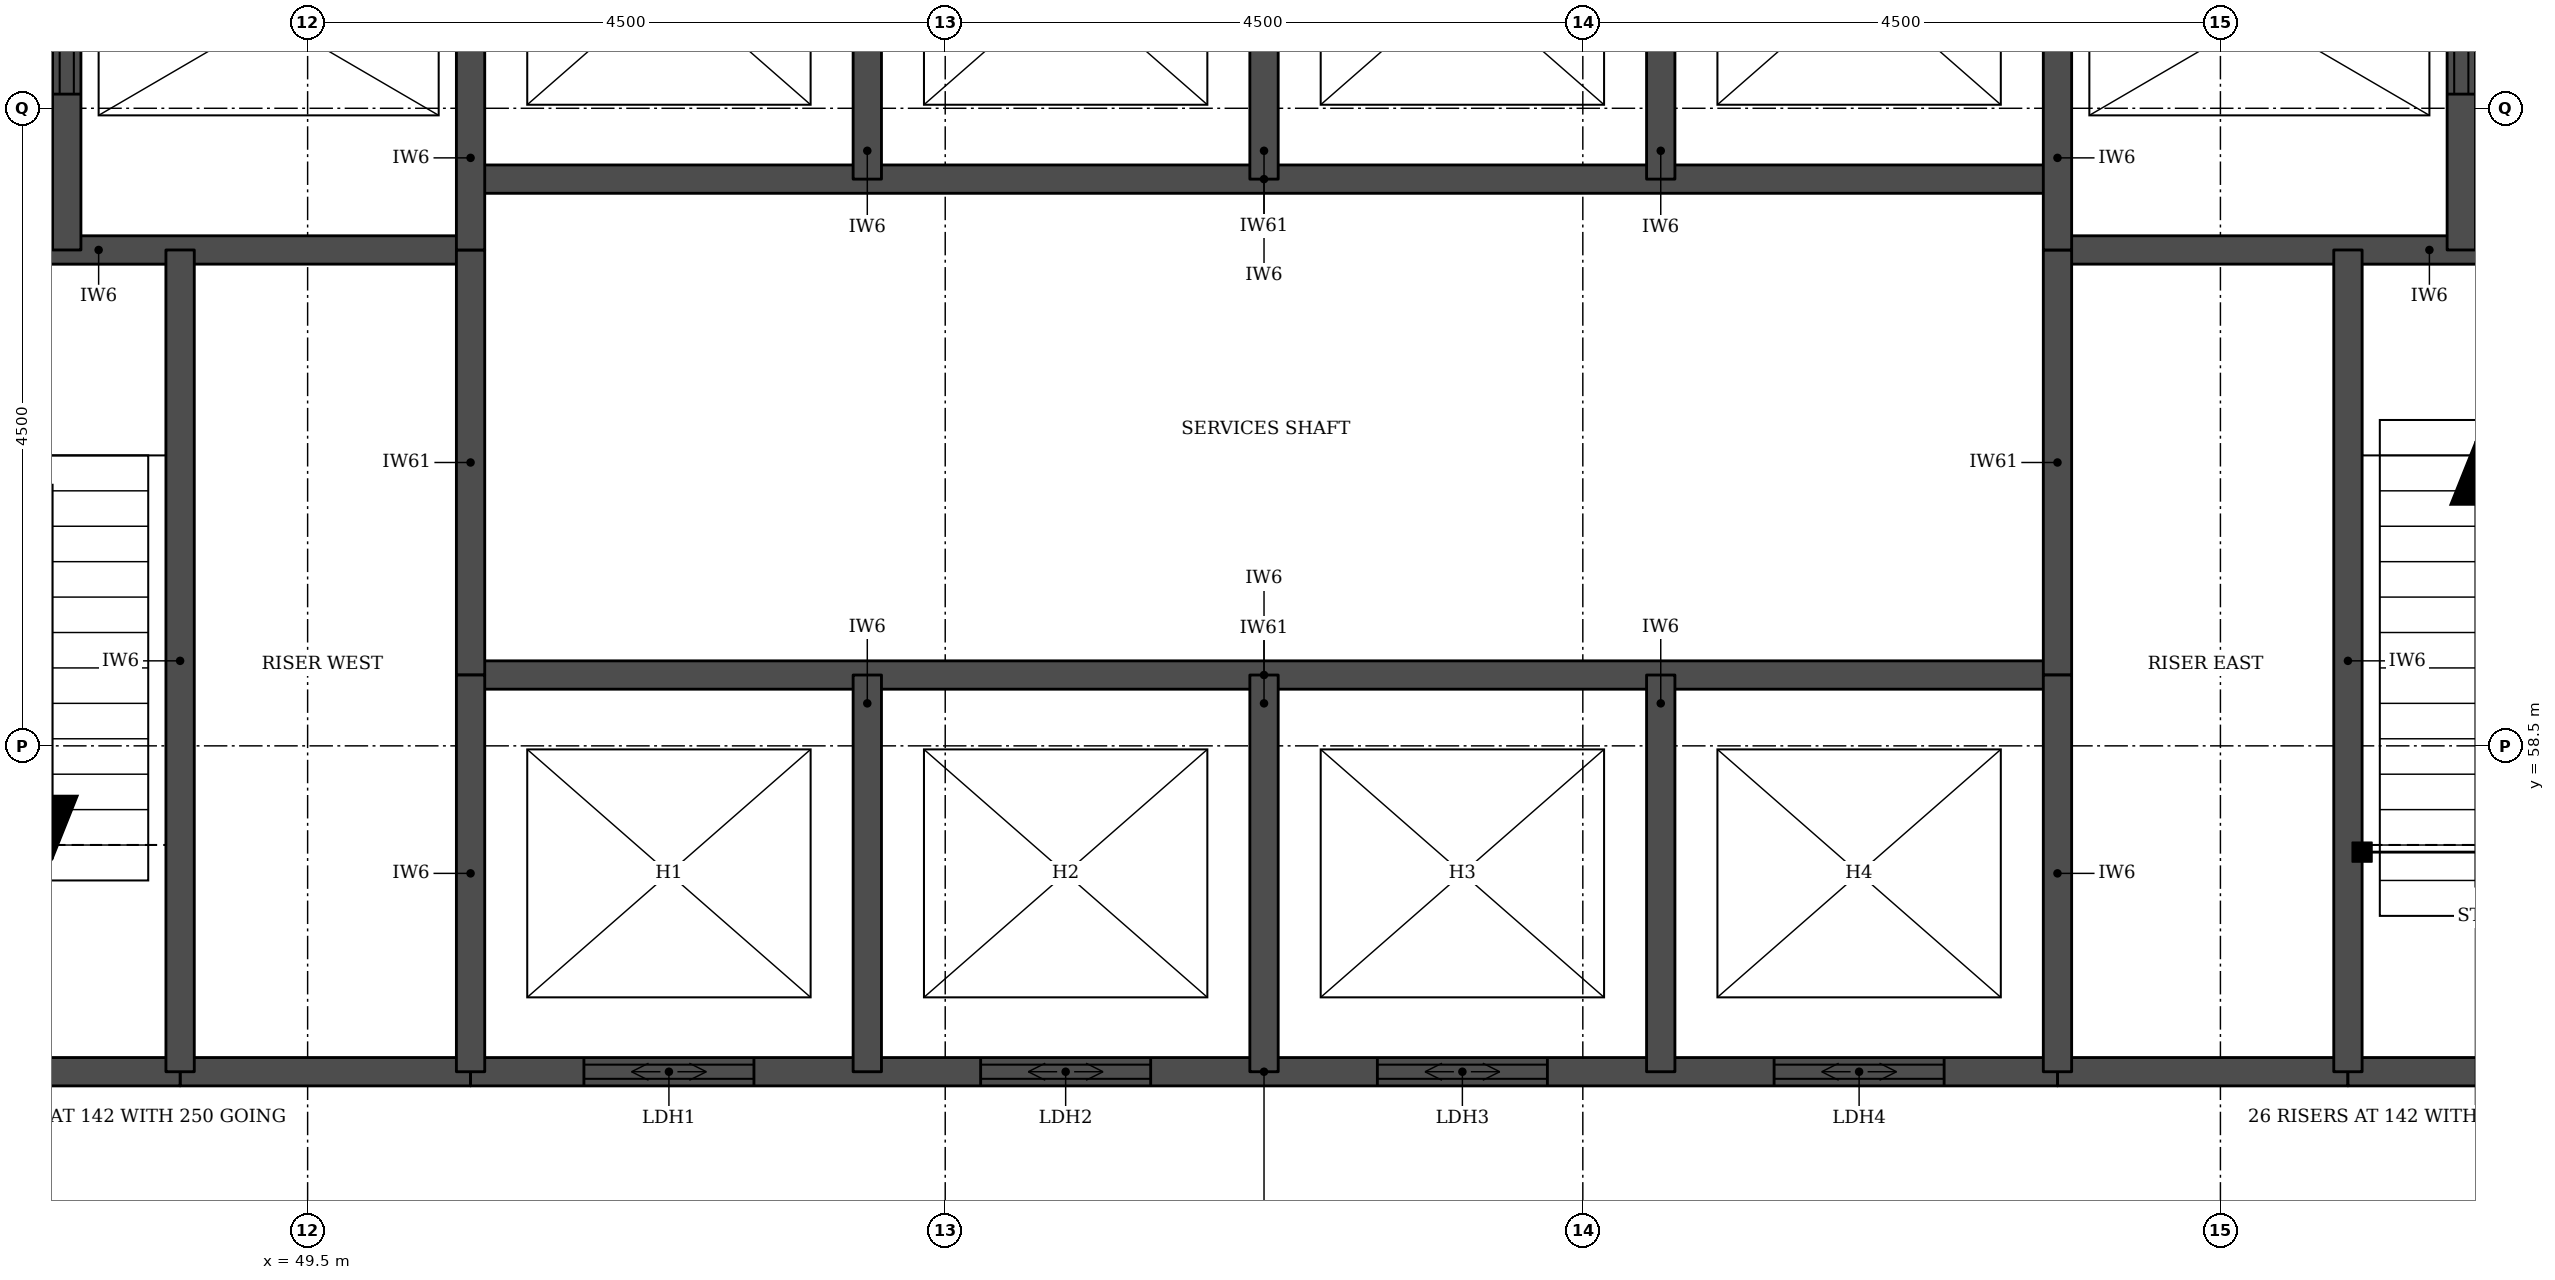
"""IFC4 building model, lengths in metres.
Left out: names, types, materials, properties, quantities, classifications, styles, units other than length and angle.
Written with IfcOpenShell. Run it as: python <this file> out.ifc"""

import sys

from ifc_helpers import new_model, si_unit, direction, frame, frame_2d, origin, place, context, subcontext, project, spatial, rectangle, extrude, element, fill, save


model = new_model("IFC4")
c1 = context("Model", 3, precision=1e-05, world=origin(), true_north=direction((0.0, 1.0)))
c2 = subcontext(c1, "Body", "Model", "MODEL_VIEW")
j1 = project(units=[si_unit("LENGTHUNIT", "METRE"), si_unit("PLANEANGLEUNIT", "RADIAN")], contexts=[c1])
p1 = place(None, origin())
s1 = spatial("IfcSite", under=j1, at=p1, CompositionType="ELEMENT")
p2 = place(p1, origin())
s2 = spatial("IfcBuilding", under=s1, at=p2, CompositionType="ELEMENT")
p3 = place(p2, frame((0.0, 0.0, 158.8)))
s3 = spatial("IfcBuildingStorey", under=s2, at=p3, CompositionType="ELEMENT", Elevation=158.8)
for number, where, z_axis, x_axis in (
    (1, (48.6, 56.2, 0.0), (0.0, 0.0, 1.0), (1.0, 0.0, 0.0)),
    (2, (61.85, 56.2, 0.0), (0.0, 0.0, 1.0), (1.0, 0.0, 0.0)),
):
    element("IfcWall", number, at=place(p3, frame(where, z_axis=z_axis, x_axis=x_axis)), inside=s3, PredefinedType="SOLIDWALL", context=c2, shape_type="SweptSolid", body=[
        extrude(rectangle(XDim=2.05, YDim=0.2, at=frame_2d((1.025, 0.0))), origin(), (0.0, 0.0, 1.0), 3.55),
    ])
p4 = place(p3, frame((45.4, 56.2, 0.0), z_axis=(0.0, 0.0, 1.0), x_axis=(1.0, 0.0, 0.0)))
e3 = element("IfcWall", 3, at=p4, inside=s3, PredefinedType="SOLIDWALL", context=c2, shape_type="SweptSolid", body=[
    extrude(rectangle(XDim=3.2, YDim=0.2, at=frame_2d((1.6, 0.0))), origin(), (0.0, 0.0, 1.0), 3.55),
])
p5 = place(p3, frame((50.65, 56.2, 0.0), z_axis=(0.0, 0.0, 1.0), x_axis=(1.0, 0.0, 0.0)))
e4 = element("IfcWall", 4, at=p5, inside=s3, PredefinedType="SOLIDWALL", context=c2, shape_type="SweptSolid", body=[
    extrude(rectangle(XDim=11.2, YDim=0.2, at=frame_2d((5.6, 0.0))), origin(), (0.0, 0.0, 1.0), 3.55),
])
p6 = place(p5, frame((0.8, 0.0, 0.0)))
e5 = element("IfcOpeningElement", 5, at=p6, cuts=e4, PredefinedType="OPENING", context=c2, shape_type="SweptSolid", body=[
    extrude(rectangle(XDim=1.2, YDim=2.1, at=frame_2d((0.6, 1.05))), frame((0.0, 0.11, 0.0), z_axis=(0.0, -1.0, 0.0), x_axis=(1.0, 0.0, 0.0)), (0.0, 0.0, 1.0), 0.22),
])
p7 = place(p5, frame((3.6, 0.0, 0.0)))
e6 = element("IfcOpeningElement", 6, at=p7, cuts=e4, PredefinedType="OPENING", context=c2, shape_type="SweptSolid", body=[
    extrude(rectangle(XDim=1.2, YDim=2.1, at=frame_2d((0.6, 1.05))), frame((0.0, 0.11, 0.0), z_axis=(0.0, -1.0, 0.0), x_axis=(1.0, 0.0, 0.0)), (0.0, 0.0, 1.0), 0.22),
])
p8 = place(p5, frame((6.4, 0.0, 0.0)))
e7 = element("IfcOpeningElement", 7, at=p8, cuts=e4, PredefinedType="OPENING", context=c2, shape_type="SweptSolid", body=[
    extrude(rectangle(XDim=1.2, YDim=2.1, at=frame_2d((0.6, 1.05))), frame((0.0, 0.11, 0.0), z_axis=(0.0, -1.0, 0.0), x_axis=(1.0, 0.0, 0.0)), (0.0, 0.0, 1.0), 0.22),
])
p9 = place(p5, frame((9.2, 0.0, 0.0)))
e8 = element("IfcOpeningElement", 8, at=p9, cuts=e4, PredefinedType="OPENING", context=c2, shape_type="SweptSolid", body=[
    extrude(rectangle(XDim=1.2, YDim=2.1, at=frame_2d((0.6, 1.05))), frame((0.0, 0.11, 0.0), z_axis=(0.0, -1.0, 0.0), x_axis=(1.0, 0.0, 0.0)), (0.0, 0.0, 1.0), 0.22),
])
p10 = place(p3, frame((63.9, 56.2, 0.0), z_axis=(0.0, 0.0, 1.0), x_axis=(1.0, 0.0, 0.0)))
e9 = element("IfcWall", 9, at=p10, inside=s3, PredefinedType="SOLIDWALL", context=c2, shape_type="SweptSolid", body=[
    extrude(rectangle(XDim=3.2, YDim=0.2, at=frame_2d((1.6, 0.0))), origin(), (0.0, 0.0, 1.0), 3.55),
])
p11 = place(p3, frame((50.65, 59.0, 0.0), z_axis=(0.0, 0.0, 1.0), x_axis=(1.0, 0.0, 0.0)))
e10 = element("IfcWall", 10, at=p11, inside=s3, PredefinedType="SOLIDWALL", context=c2, shape_type="SweptSolid", body=[
    extrude(rectangle(XDim=11.2, YDim=0.2, at=frame_2d((5.6, 0.0))), origin(), (0.0, 0.0, 1.0), 3.7),
])
for number, where, z_axis, x_axis in (
    (11, (45.4, 62.0, 0.0), (0.0, 0.0, 1.0), (1.0, 0.0, 0.0)),
    (12, (61.85, 62.0, 0.0), (0.0, 0.0, 1.0), (1.0, 0.0, 0.0)),
):
    element("IfcWall", number, at=place(p3, frame(where, z_axis=z_axis, x_axis=x_axis)), inside=s3, PredefinedType="SOLIDWALL", context=c2, shape_type="SweptSolid", body=[
        extrude(rectangle(XDim=5.25, YDim=0.2, at=frame_2d((2.625, 0.0))), origin(), (0.0, 0.0, 1.0), 3.55),
    ])
p12 = place(p3, frame((50.65, 62.5, 0.0), z_axis=(0.0, 0.0, 1.0), x_axis=(1.0, 0.0, 0.0)))
e13 = element("IfcWall", 13, at=p12, inside=s3, PredefinedType="SOLIDWALL", context=c2, shape_type="SweptSolid", body=[
    extrude(rectangle(XDim=11.2, YDim=0.2, at=frame_2d((5.6, 0.0))), origin(), (0.0, 0.0, 1.0), 3.7),
])
p13 = place(p3, frame((47.8, 62.0, 0.0), z_axis=(0.0, 0.0, 1.0), x_axis=(0.0, 1.0, 0.0)))
e14 = element("IfcWall", 14, at=p13, inside=s3, PredefinedType="SOLIDWALL", context=c2, shape_type="SweptSolid", body=[
    extrude(rectangle(XDim=3.3, YDim=0.2, at=frame_2d((1.65, 0.0))), origin(), (0.0, 0.0, 1.0), 3.55),
])
p14 = place(p13, frame((1.1, 0.0, 0.0)))
e15 = element("IfcOpeningElement", 15, at=p14, cuts=e14, PredefinedType="OPENING", context=c2, shape_type="SweptSolid", body=[
    extrude(rectangle(XDim=1.1, YDim=2.1, at=frame_2d((0.55, 1.05))), frame((0.0, 0.11, 0.0), z_axis=(0.0, -1.0, 0.0), x_axis=(1.0, 0.0, 0.0)), (0.0, 0.0, 1.0), 0.22),
])
p15 = place(p3, frame((48.6, 56.2, 0.0), z_axis=(0.0, 0.0, 1.0), x_axis=(0.0, 1.0, 0.0)))
e16 = element("IfcWall", 16, at=p15, inside=s3, PredefinedType="SOLIDWALL", context=c2, shape_type="SweptSolid", body=[
    extrude(rectangle(XDim=5.8, YDim=0.2, at=frame_2d((2.9, 0.0))), origin(), (0.0, 0.0, 1.0), 3.55),
])
p16 = place(p3, frame((50.65, 59.0, 0.0), z_axis=(0.0, 0.0, 1.0), x_axis=(0.0, 1.0, 0.0)))
e17 = element("IfcWall", 17, at=p16, inside=s3, PredefinedType="SOLIDWALL", context=c2, shape_type="SweptSolid", body=[
    extrude(rectangle(XDim=3.0, YDim=0.2, at=frame_2d((1.5, 0.0))), origin(), (0.0, 0.0, 1.0), 3.7),
])
p17 = place(p3, frame((50.65, 56.2, 0.0), z_axis=(0.0, 0.0, 1.0), x_axis=(0.0, 1.0, 0.0)))
e18 = element("IfcWall", 18, at=p17, inside=s3, PredefinedType="SOLIDWALL", context=c2, shape_type="SweptSolid", body=[
    extrude(rectangle(XDim=2.8, YDim=0.2, at=frame_2d((1.4, 0.0))), origin(), (0.0, 0.0, 1.0), 3.55),
])
p18 = place(p3, frame((50.65, 62.0, 0.0), z_axis=(0.0, 0.0, 1.0), x_axis=(0.0, 1.0, 0.0)))
e19 = element("IfcWall", 19, at=p18, inside=s3, PredefinedType="SOLIDWALL", context=c2, shape_type="SweptSolid", body=[
    extrude(rectangle(XDim=3.3, YDim=0.2, at=frame_2d((1.65, 0.0))), origin(), (0.0, 0.0, 1.0), 3.55),
])
for number, where, z_axis, x_axis in (
    (20, (53.45, 56.2, 0.0), (0.0, 0.0, 1.0), (0.0, 1.0, 0.0)),
    (21, (53.45, 62.5, 0.0), (0.0, 0.0, 1.0), (0.0, 1.0, 0.0)),
    (22, (56.25, 56.2, 0.0), (0.0, 0.0, 1.0), (0.0, 1.0, 0.0)),
    (23, (56.25, 62.5, 0.0), (0.0, 0.0, 1.0), (0.0, 1.0, 0.0)),
    (24, (59.05, 56.2, 0.0), (0.0, 0.0, 1.0), (0.0, 1.0, 0.0)),
    (25, (59.05, 62.5, 0.0), (0.0, 0.0, 1.0), (0.0, 1.0, 0.0)),
):
    element("IfcWall", number, at=place(p3, frame(where, z_axis=z_axis, x_axis=x_axis)), inside=s3, PredefinedType="SOLIDWALL", context=c2, shape_type="SweptSolid", body=[
        extrude(rectangle(XDim=2.8, YDim=0.2, at=frame_2d((1.4, 0.0))), origin(), (0.0, 0.0, 1.0), 3.55),
    ])
p19 = place(p3, frame((61.85, 59.0, 0.0), z_axis=(0.0, 0.0, 1.0), x_axis=(0.0, 1.0, 0.0)))
e26 = element("IfcWall", 26, at=p19, inside=s3, PredefinedType="SOLIDWALL", context=c2, shape_type="SweptSolid", body=[
    extrude(rectangle(XDim=3.0, YDim=0.2, at=frame_2d((1.5, 0.0))), origin(), (0.0, 0.0, 1.0), 3.7),
])
p20 = place(p3, frame((61.85, 56.2, 0.0), z_axis=(0.0, 0.0, 1.0), x_axis=(0.0, 1.0, 0.0)))
e27 = element("IfcWall", 27, at=p20, inside=s3, PredefinedType="SOLIDWALL", context=c2, shape_type="SweptSolid", body=[
    extrude(rectangle(XDim=2.8, YDim=0.2, at=frame_2d((1.4, 0.0))), origin(), (0.0, 0.0, 1.0), 3.55),
])
p21 = place(p3, frame((61.85, 62.0, 0.0), z_axis=(0.0, 0.0, 1.0), x_axis=(0.0, 1.0, 0.0)))
e28 = element("IfcWall", 28, at=p21, inside=s3, PredefinedType="SOLIDWALL", context=c2, shape_type="SweptSolid", body=[
    extrude(rectangle(XDim=3.3, YDim=0.2, at=frame_2d((1.65, 0.0))), origin(), (0.0, 0.0, 1.0), 3.55),
])
p22 = place(p3, frame((63.9, 56.2, 0.0), z_axis=(0.0, 0.0, 1.0), x_axis=(0.0, 1.0, 0.0)))
e29 = element("IfcWall", 29, at=p22, inside=s3, PredefinedType="SOLIDWALL", context=c2, shape_type="SweptSolid", body=[
    extrude(rectangle(XDim=5.8, YDim=0.2, at=frame_2d((2.9, 0.0))), origin(), (0.0, 0.0, 1.0), 3.55),
])
p23 = place(p3, frame((64.7, 62.0, 0.0), z_axis=(0.0, 0.0, 1.0), x_axis=(0.0, 1.0, 0.0)))
e30 = element("IfcWall", 30, at=p23, inside=s3, PredefinedType="SOLIDWALL", context=c2, shape_type="SweptSolid", body=[
    extrude(rectangle(XDim=3.3, YDim=0.2, at=frame_2d((1.65, 0.0))), origin(), (0.0, 0.0, 1.0), 3.55),
])
p24 = place(p23, frame((1.1, 0.0, 0.0)))
e31 = element("IfcOpeningElement", 31, at=p24, cuts=e30, PredefinedType="OPENING", context=c2, shape_type="SweptSolid", body=[
    extrude(rectangle(XDim=1.1, YDim=2.1, at=frame_2d((0.55, 1.05))), frame((0.0, 0.11, 0.0), z_axis=(0.0, -1.0, 0.0), x_axis=(1.0, 0.0, 0.0)), (0.0, 0.0, 1.0), 0.22),
])
p25 = place(p6, origin())
e32 = element("IfcDoor", 32, at=p25, inside=s3, OperationType="DOUBLE_DOOR_SLIDING", PredefinedType="DOOR", context=c2, shape_type="SweptSolid", body=[
    extrude(rectangle(XDim=1.2, YDim=2.1, at=frame_2d((0.6, 1.05))), frame((0.0, 0.025, 0.0), z_axis=(0.0, -1.0, 0.0), x_axis=(1.0, 0.0, 0.0)), (0.0, 0.0, 1.0), 0.05),
])
fill(e5, e32)
p26 = place(p7, origin())
e33 = element("IfcDoor", 33, at=p26, inside=s3, OperationType="DOUBLE_DOOR_SLIDING", PredefinedType="DOOR", context=c2, shape_type="SweptSolid", body=[
    extrude(rectangle(XDim=1.2, YDim=2.1, at=frame_2d((0.6, 1.05))), frame((0.0, 0.025, 0.0), z_axis=(0.0, -1.0, 0.0), x_axis=(1.0, 0.0, 0.0)), (0.0, 0.0, 1.0), 0.05),
])
fill(e6, e33)
p27 = place(p8, origin())
e34 = element("IfcDoor", 34, at=p27, inside=s3, OperationType="DOUBLE_DOOR_SLIDING", PredefinedType="DOOR", context=c2, shape_type="SweptSolid", body=[
    extrude(rectangle(XDim=1.2, YDim=2.1, at=frame_2d((0.6, 1.05))), frame((0.0, 0.025, 0.0), z_axis=(0.0, -1.0, 0.0), x_axis=(1.0, 0.0, 0.0)), (0.0, 0.0, 1.0), 0.05),
])
fill(e7, e34)
p28 = place(p9, origin())
e35 = element("IfcDoor", 35, at=p28, inside=s3, OperationType="DOUBLE_DOOR_SLIDING", PredefinedType="DOOR", context=c2, shape_type="SweptSolid", body=[
    extrude(rectangle(XDim=1.2, YDim=2.1, at=frame_2d((0.6, 1.05))), frame((0.0, 0.025, 0.0), z_axis=(0.0, -1.0, 0.0), x_axis=(1.0, 0.0, 0.0)), (0.0, 0.0, 1.0), 0.05),
])
fill(e8, e35)
p29 = place(p14, origin())
e36 = element("IfcDoor", 36, at=p29, inside=s3, OperationType="DOUBLE_DOOR_SLIDING", PredefinedType="DOOR", context=c2, shape_type="SweptSolid", body=[
    extrude(rectangle(XDim=1.1, YDim=2.1, at=frame_2d((0.55, 1.05))), frame((0.0, 0.025, 0.0), z_axis=(0.0, -1.0, 0.0), x_axis=(1.0, 0.0, 0.0)), (0.0, 0.0, 1.0), 0.05),
])
fill(e15, e36)
p30 = place(p24, origin())
e37 = element("IfcDoor", 37, at=p30, inside=s3, OperationType="DOUBLE_DOOR_SLIDING", PredefinedType="DOOR", context=c2, shape_type="SweptSolid", body=[
    extrude(rectangle(XDim=1.1, YDim=2.1, at=frame_2d((0.55, 1.05))), frame((0.0, 0.025, 0.0), z_axis=(0.0, -1.0, 0.0), x_axis=(1.0, 0.0, 0.0)), (0.0, 0.0, 1.0), 0.05),
])
fill(e31, e37)
save(model, sys.argv[1])
